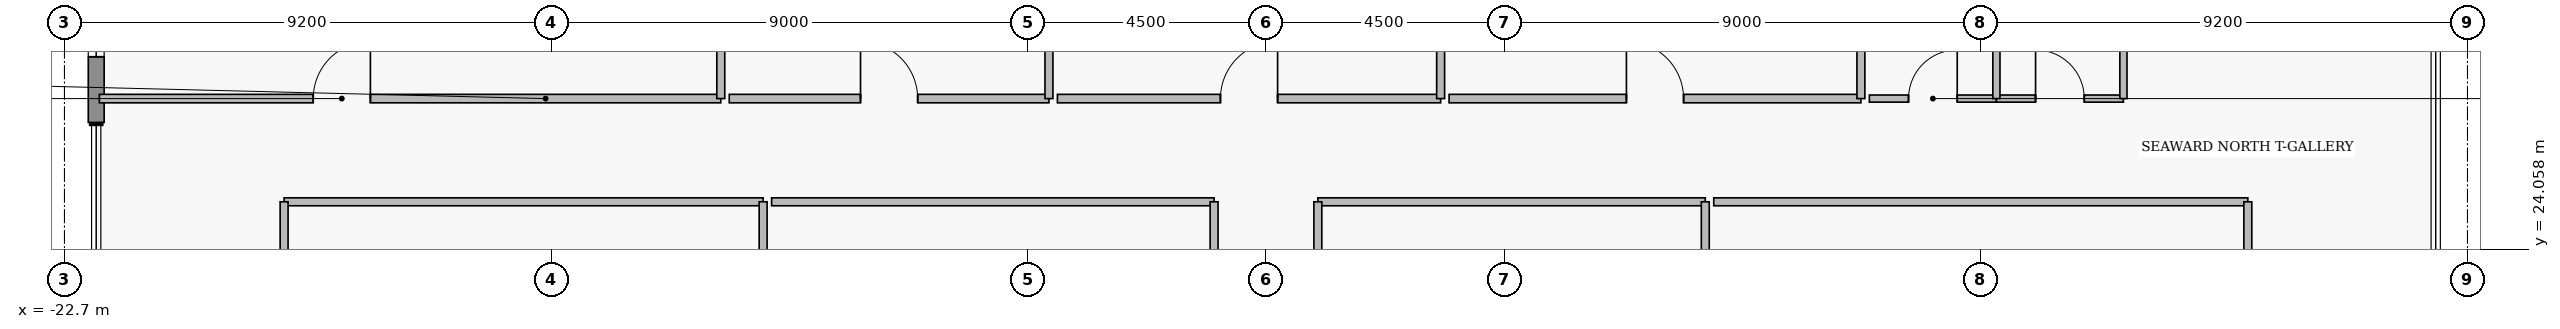
"""IFC4 building model, lengths in metres.
Left out: names, types, materials, properties, quantities, classifications, styles, units other than length and angle.
Written with IfcOpenShell. Run it as: python <this file> out.ifc"""

import sys

from ifc_helpers import new_model, si_unit, direction, frame, frame_2d, origin, place, context, subcontext, project, spatial, rectangle, extrude, element, fill, save


model = new_model("IFC4")
c1 = context("Model", 3, precision=1e-05, world=origin(), true_north=direction((0.0, 1.0)))
c2 = subcontext(c1, "Body", "Model", "MODEL_VIEW")
j1 = project(units=[si_unit("LENGTHUNIT", "METRE"), si_unit("PLANEANGLEUNIT", "RADIAN")], contexts=[c1])
p1 = place(None, origin())
s1 = spatial("IfcSite", under=j1, at=p1, CompositionType="ELEMENT")
p2 = place(p1, origin())
s2 = spatial("IfcBuilding", under=s1, at=p2, CompositionType="ELEMENT")
p3 = place(p2, frame((0.0, 0.0, 172.8)))
s3 = spatial("IfcBuildingStorey", under=s2, at=p3, CompositionType="ELEMENT", Elevation=172.8)
p4 = place(p3, frame((-22.1, 26.45, 0.0), z_axis=(0.0, 0.0, 1.0), x_axis=(0.0, 1.0, 0.0)))
e1 = element("IfcWall", 1, at=p4, inside=s3, PredefinedType="STANDARD", context=c2, shape_type="SweptSolid", body=[
    extrude(rectangle(XDim=3.75, YDim=0.3, at=frame_2d((1.875, 0.0))), origin(), (0.0, 0.0, 1.0), 4.38),
])
p5 = place(p4, frame((1.24, 0.0, 0.85)))
e2 = element("IfcOpeningElement", 2, at=p5, cuts=e1, PredefinedType="OPENING", context=c2, shape_type="SweptSolid", body=[
    extrude(rectangle(XDim=1.6, YDim=1.8, at=frame_2d((0.8, 0.9))), frame((0.0, 0.16, 0.0), z_axis=(0.0, -1.0, 0.0), x_axis=(1.0, 0.0, 0.0)), (0.0, 0.0, 1.0), 0.32),
])
p6 = place(p3, frame((-22.04, 26.9, 0.0), z_axis=(0.0, 0.0, 1.0), x_axis=(1.0, 0.0, 0.0)))
e3 = element("IfcWall", 3, at=p6, inside=s3, PredefinedType="PARTITIONING", context=c2, shape_type="SweptSolid", body=[
    extrude(rectangle(XDim=11.74, YDim=0.16, at=frame_2d((5.87, 0.0))), origin(), (0.0, 0.0, 1.0), 4.38),
])
p7 = place(p6, frame((4.04, 0.0, 0.0)))
e4 = element("IfcOpeningElement", 4, at=p7, cuts=e3, PredefinedType="OPENING", context=c2, shape_type="SweptSolid", body=[
    extrude(rectangle(XDim=1.08, YDim=2.18, at=frame_2d((0.54, 1.09))), frame((0.0, 0.09, 0.0), z_axis=(0.0, -1.0, 0.0), x_axis=(1.0, 0.0, 0.0)), (0.0, 0.0, 1.0), 0.18),
])
p8 = place(p3, frame((-10.14, 26.9, 0.0), z_axis=(0.0, 0.0, 1.0), x_axis=(1.0, 0.0, 0.0)))
e5 = element("IfcWall", 5, at=p8, inside=s3, PredefinedType="PARTITIONING", context=c2, shape_type="SweptSolid", body=[
    extrude(rectangle(XDim=6.04, YDim=0.16, at=frame_2d((3.02, 0.0))), origin(), (0.0, 0.0, 1.0), 4.38),
])
p9 = place(p8, frame((2.48, 0.0, 0.0)))
e6 = element("IfcOpeningElement", 6, at=p9, cuts=e5, PredefinedType="OPENING", context=c2, shape_type="SweptSolid", body=[
    extrude(rectangle(XDim=1.08, YDim=2.18, at=frame_2d((0.54, 1.09))), frame((0.0, 0.09, 0.0), z_axis=(0.0, -1.0, 0.0), x_axis=(1.0, 0.0, 0.0)), (0.0, 0.0, 1.0), 0.18),
])
p10 = place(p3, frame((-3.94, 26.9, 0.0), z_axis=(0.0, 0.0, 1.0), x_axis=(1.0, 0.0, 0.0)))
e7 = element("IfcWall", 7, at=p10, inside=s3, PredefinedType="PARTITIONING", context=c2, shape_type="SweptSolid", body=[
    extrude(rectangle(XDim=7.24, YDim=0.16, at=frame_2d((3.62, 0.0))), origin(), (0.0, 0.0, 1.0), 4.38),
])
p11 = place(p10, frame((3.08, 0.0, 0.0)))
e8 = element("IfcOpeningElement", 8, at=p11, cuts=e7, PredefinedType="OPENING", context=c2, shape_type="SweptSolid", body=[
    extrude(rectangle(XDim=1.08, YDim=2.18, at=frame_2d((0.54, 1.09))), frame((0.0, 0.09, 0.0), z_axis=(0.0, -1.0, 0.0), x_axis=(1.0, 0.0, 0.0)), (0.0, 0.0, 1.0), 0.18),
])
p12 = place(p3, frame((3.46, 26.9, 0.0), z_axis=(0.0, 0.0, 1.0), x_axis=(1.0, 0.0, 0.0)))
e9 = element("IfcWall", 9, at=p12, inside=s3, PredefinedType="PARTITIONING", context=c2, shape_type="SweptSolid", body=[
    extrude(rectangle(XDim=7.78, YDim=0.16, at=frame_2d((3.89, 0.0))), origin(), (0.0, 0.0, 1.0), 4.38),
])
p13 = place(p12, frame((3.35, 0.0, 0.0)))
e10 = element("IfcOpeningElement", 10, at=p13, cuts=e9, PredefinedType="OPENING", context=c2, shape_type="SweptSolid", body=[
    extrude(rectangle(XDim=1.08, YDim=2.18, at=frame_2d((0.54, 1.09))), frame((0.0, 0.09, 0.0), z_axis=(0.0, -1.0, 0.0), x_axis=(1.0, 0.0, 0.0)), (0.0, 0.0, 1.0), 0.18),
])
p14 = place(p3, frame((11.4, 26.9, 0.0), z_axis=(0.0, 0.0, 1.0), x_axis=(1.0, 0.0, 0.0)))
e11 = element("IfcWall", 11, at=p14, inside=s3, PredefinedType="PLUMBINGWALL", context=c2, shape_type="SweptSolid", body=[
    extrude(rectangle(XDim=2.4, YDim=0.135, at=frame_2d((1.2, 0.0))), origin(), (0.0, 0.0, 1.0), 4.38),
])
p15 = place(p14, frame((0.74, 0.0, 0.0)))
e12 = element("IfcOpeningElement", 12, at=p15, cuts=e11, PredefinedType="OPENING", context=c2, shape_type="SweptSolid", body=[
    extrude(rectangle(XDim=0.92, YDim=2.12, at=frame_2d((0.46, 1.06))), frame((0.0, 0.077, 0.0), z_axis=(0.0, -1.0, 0.0), x_axis=(1.0, 0.0, 0.0)), (0.0, 0.0, 1.0), 0.155),
])
p16 = place(p3, frame((13.8, 26.9, 0.0), z_axis=(0.0, 0.0, 1.0), x_axis=(1.0, 0.0, 0.0)))
e13 = element("IfcWall", 13, at=p16, inside=s3, PredefinedType="PLUMBINGWALL", context=c2, shape_type="SweptSolid", body=[
    extrude(rectangle(XDim=2.4, YDim=0.135, at=frame_2d((1.2, 0.0))), origin(), (0.0, 0.0, 1.0), 4.38),
])
p17 = place(p16, frame((0.74, 0.0, 0.0)))
e14 = element("IfcOpeningElement", 14, at=p17, cuts=e13, PredefinedType="OPENING", context=c2, shape_type="SweptSolid", body=[
    extrude(rectangle(XDim=0.92, YDim=2.12, at=frame_2d((0.46, 1.06))), frame((0.0, 0.077, 0.0), z_axis=(0.0, -1.0, 0.0), x_axis=(1.0, 0.0, 0.0)), (0.0, 0.0, 1.0), 0.155),
])
for number, where, z_axis, x_axis in (
    (15, (-10.3, 26.9, 0.0), (0.0, 0.0, 1.0), (0.0, 1.0, 0.0)),
    (16, (-4.1, 26.9, 0.0), (0.0, 0.0, 1.0), (0.0, 1.0, 0.0)),
    (17, (3.3, 26.9, 0.0), (0.0, 0.0, 1.0), (0.0, 1.0, 0.0)),
    (18, (11.24, 26.9, 0.0), (0.0, 0.0, 1.0), (0.0, 1.0, 0.0)),
):
    element("IfcWall", number, at=place(p3, frame(where, z_axis=z_axis, x_axis=x_axis)), inside=s3, PredefinedType="PARTITIONING", context=c2, shape_type="SweptSolid", body=[
        extrude(rectangle(XDim=6.64, YDim=0.15, at=frame_2d((3.32, 0.0))), origin(), (0.0, 0.0, 1.0), 4.38),
    ])
p18 = place(p3, frame((-18.55, 24.95, 0.0), z_axis=(0.0, 0.0, 1.0), x_axis=(1.0, 0.0, 0.0)))
e19 = element("IfcWall", 19, at=p18, inside=s3, PredefinedType="PARTITIONING", context=c2, shape_type="SweptSolid", body=[
    extrude(rectangle(XDim=9.05, YDim=0.15, at=frame_2d((4.525, 0.0))), origin(), (0.0, 0.0, 1.0), 3.974),
])
for number, where, z_axis, x_axis in (
    (20, (-18.55, 16.75, 0.0), (0.0, 0.0, 1.0), (0.0, 1.0, 0.0)),
    (21, (-9.5, 16.75, 0.0), (0.0, 0.0, 1.0), (0.0, 1.0, 0.0)),
):
    element("IfcWall", number, at=place(p3, frame(where, z_axis=z_axis, x_axis=x_axis)), inside=s3, PredefinedType="PARTITIONING", context=c2, shape_type="SweptSolid", body=[
        extrude(rectangle(XDim=8.2, YDim=0.15, at=frame_2d((4.1, 0.0))), origin(), (0.0, 0.0, 1.0), 4.38),
    ])
p19 = place(p3, frame((-9.34, 24.95, 0.0), z_axis=(0.0, 0.0, 1.0), x_axis=(1.0, 0.0, 0.0)))
e22 = element("IfcWall", 22, at=p19, inside=s3, PredefinedType="PARTITIONING", context=c2, shape_type="SweptSolid", body=[
    extrude(rectangle(XDim=8.36, YDim=0.15, at=frame_2d((4.18, 0.0))), origin(), (0.0, 0.0, 1.0), 3.974),
])
p20 = place(p3, frame((-0.98, 16.75, 0.0), z_axis=(0.0, 0.0, 1.0), x_axis=(0.0, 1.0, 0.0)))
e23 = element("IfcWall", 23, at=p20, inside=s3, PredefinedType="PARTITIONING", context=c2, shape_type="SweptSolid", body=[
    extrude(rectangle(XDim=8.2, YDim=0.15, at=frame_2d((4.1, 0.0))), origin(), (0.0, 0.0, 1.0), 4.38),
])
p21 = place(p3, frame((0.98, 24.95, 0.0), z_axis=(0.0, 0.0, 1.0), x_axis=(1.0, 0.0, 0.0)))
e24 = element("IfcWall", 24, at=p21, inside=s3, PredefinedType="PARTITIONING", context=c2, shape_type="SweptSolid", body=[
    extrude(rectangle(XDim=7.32, YDim=0.15, at=frame_2d((3.66, 0.0))), origin(), (0.0, 0.0, 1.0), 3.974),
])
for number, where, z_axis, x_axis in (
    (25, (0.98, 16.75, 0.0), (0.0, 0.0, 1.0), (0.0, 1.0, 0.0)),
    (26, (8.3, 16.75, 0.0), (0.0, 0.0, 1.0), (0.0, 1.0, 0.0)),
):
    element("IfcWall", number, at=place(p3, frame(where, z_axis=z_axis, x_axis=x_axis)), inside=s3, PredefinedType="PARTITIONING", context=c2, shape_type="SweptSolid", body=[
        extrude(rectangle(XDim=8.2, YDim=0.15, at=frame_2d((4.1, 0.0))), origin(), (0.0, 0.0, 1.0), 4.38),
    ])
p22 = place(p3, frame((8.46, 24.95, 0.0), z_axis=(0.0, 0.0, 1.0), x_axis=(1.0, 0.0, 0.0)))
e27 = element("IfcWall", 27, at=p22, inside=s3, PredefinedType="PARTITIONING", context=c2, shape_type="SweptSolid", body=[
    extrude(rectangle(XDim=10.09, YDim=0.15, at=frame_2d((5.045, 0.0))), origin(), (0.0, 0.0, 1.0), 3.974),
])
p23 = place(p3, frame((18.55, 16.75, 0.0), z_axis=(0.0, 0.0, 1.0), x_axis=(0.0, 1.0, 0.0)))
e28 = element("IfcWall", 28, at=p23, inside=s3, PredefinedType="PARTITIONING", context=c2, shape_type="SweptSolid", body=[
    extrude(rectangle(XDim=8.2, YDim=0.15, at=frame_2d((4.1, 0.0))), origin(), (0.0, 0.0, 1.0), 4.38),
])
p24 = place(p3, frame((16.2, 26.9, 0.0), z_axis=(0.0, 0.0, 1.0), x_axis=(0.0, 1.0, 0.0)))
e29 = element("IfcWall", 29, at=p24, inside=s3, PredefinedType="PLUMBINGWALL", context=c2, shape_type="SweptSolid", body=[
    extrude(rectangle(XDim=4.4, YDim=0.135, at=frame_2d((2.2, 0.0))), origin(), (0.0, 0.0, 1.0), 4.38),
])
p25 = place(p3, frame((13.8, 26.9, 0.0), z_axis=(0.0, 0.0, 1.0), x_axis=(0.0, 1.0, 0.0)))
e30 = element("IfcWall", 30, at=p25, inside=s3, PredefinedType="PLUMBINGWALL", context=c2, shape_type="SweptSolid", body=[
    extrude(rectangle(XDim=4.4, YDim=0.135, at=frame_2d((2.2, 0.0))), origin(), (0.0, 0.0, 1.0), 3.369),
])
p26 = place(p5, origin())
e31 = element("IfcWindow", 31, at=p26, inside=s3, PartitioningType="SINGLE_PANEL", PredefinedType="WINDOW", context=c2, shape_type="SweptSolid", body=[
    extrude(rectangle(XDim=1.6, YDim=1.8, at=frame_2d((0.8, 0.9))), frame((0.0, 0.03, 0.0), z_axis=(0.0, -1.0, 0.0), x_axis=(1.0, 0.0, 0.0)), (0.0, 0.0, 1.0), 0.06),
])
fill(e2, e31)
p27 = place(p7, origin())
e32 = element("IfcDoor", 32, at=p27, inside=s3, OperationType="SINGLE_SWING_RIGHT", PredefinedType="DOOR", context=c2, shape_type="SweptSolid", body=[
    extrude(rectangle(XDim=1.08, YDim=2.18, at=frame_2d((0.54, 1.09))), frame((0.0, 0.025, 0.0), z_axis=(0.0, -1.0, 0.0), x_axis=(1.0, 0.0, 0.0)), (0.0, 0.0, 1.0), 0.05),
])
fill(e4, e32)
p28 = place(p9, origin())
e33 = element("IfcDoor", 33, at=p28, inside=s3, OperationType="SINGLE_SWING_LEFT", PredefinedType="DOOR", context=c2, shape_type="SweptSolid", body=[
    extrude(rectangle(XDim=1.08, YDim=2.18, at=frame_2d((0.54, 1.09))), frame((0.0, 0.025, 0.0), z_axis=(0.0, -1.0, 0.0), x_axis=(1.0, 0.0, 0.0)), (0.0, 0.0, 1.0), 0.05),
])
fill(e6, e33)
p29 = place(p11, origin())
e34 = element("IfcDoor", 34, at=p29, inside=s3, OperationType="SINGLE_SWING_RIGHT", PredefinedType="DOOR", context=c2, shape_type="SweptSolid", body=[
    extrude(rectangle(XDim=1.08, YDim=2.18, at=frame_2d((0.54, 1.09))), frame((0.0, 0.025, 0.0), z_axis=(0.0, -1.0, 0.0), x_axis=(1.0, 0.0, 0.0)), (0.0, 0.0, 1.0), 0.05),
])
fill(e8, e34)
p30 = place(p13, origin())
e35 = element("IfcDoor", 35, at=p30, inside=s3, OperationType="SINGLE_SWING_LEFT", PredefinedType="DOOR", context=c2, shape_type="SweptSolid", body=[
    extrude(rectangle(XDim=1.08, YDim=2.18, at=frame_2d((0.54, 1.09))), frame((0.0, 0.025, 0.0), z_axis=(0.0, -1.0, 0.0), x_axis=(1.0, 0.0, 0.0)), (0.0, 0.0, 1.0), 0.05),
])
fill(e10, e35)
p31 = place(p15, origin())
e36 = element("IfcDoor", 36, at=p31, inside=s3, OperationType="SINGLE_SWING_RIGHT", PredefinedType="DOOR", context=c2, shape_type="SweptSolid", body=[
    extrude(rectangle(XDim=0.92, YDim=2.12, at=frame_2d((0.46, 1.06))), frame((0.0, 0.025, 0.0), z_axis=(0.0, -1.0, 0.0), x_axis=(1.0, 0.0, 0.0)), (0.0, 0.0, 1.0), 0.05),
])
fill(e12, e36)
p32 = place(p17, origin())
e37 = element("IfcDoor", 37, at=p32, inside=s3, OperationType="SINGLE_SWING_LEFT", PredefinedType="DOOR", context=c2, shape_type="SweptSolid", body=[
    extrude(rectangle(XDim=0.92, YDim=2.12, at=frame_2d((0.46, 1.06))), frame((0.0, 0.025, 0.0), z_axis=(0.0, -1.0, 0.0), x_axis=(1.0, 0.0, 0.0)), (0.0, 0.0, 1.0), 0.05),
])
fill(e14, e37)
save(model, sys.argv[1])
